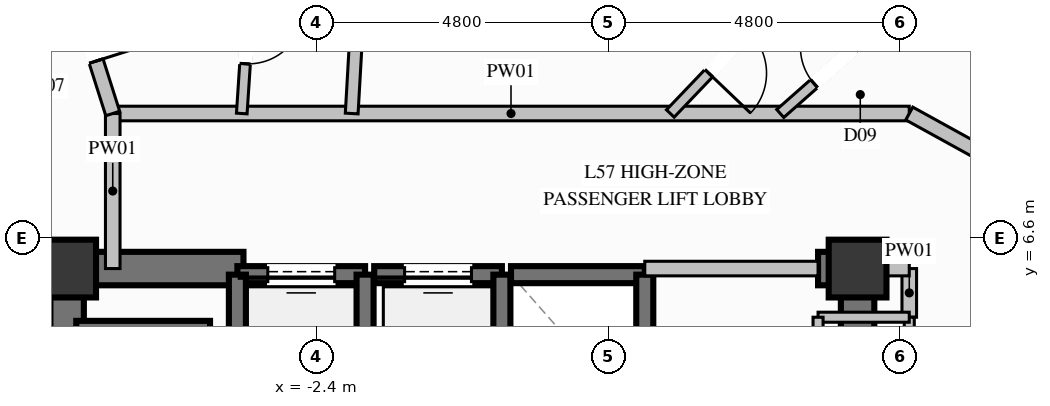
"""IFC4 building model, lengths in metres.
Left out: names, types, materials, properties, quantities, classifications, styles, units other than length and angle.
Written with IfcOpenShell. Run it as: python <this file> out.ifc"""

import sys

from ifc_helpers import new_model, si_unit, direction, frame, frame_2d, origin, origin_2d, place, context, subcontext, project, spatial, rectangle, extrude, element, fill, save


model = new_model("IFC4")
c1 = context("Model", 3, precision=1e-05, world=origin(), true_north=direction((0.0, 1.0)))
c2 = subcontext(c1, "Body", "Model", "MODEL_VIEW")
j1 = project(units=[si_unit("LENGTHUNIT", "METRE"), si_unit("PLANEANGLEUNIT", "RADIAN")], contexts=[c1])
p1 = place(None, origin())
s1 = spatial("IfcSite", under=j1, at=p1, CompositionType="ELEMENT")
p2 = place(p1, origin())
s2 = spatial("IfcBuilding", under=s1, at=p2, CompositionType="ELEMENT")
p3 = place(p2, frame((0.0, 0.0, 220.0)))
s3 = spatial("IfcBuildingStorey", under=s2, at=p3, CompositionType="ELEMENT", Elevation=220.0)
for number, where, z_axis, x_axis in (
    (1, (6.5, 6.1, 0.0), (0.0, 0.0, 1.0), (1.0, 0.0, 0.0)),
    (2, (-6.5, 6.1, 0.0), (0.0, 0.0, 1.0), (1.0, 0.0, 0.0)),
):
    element("IfcColumn", number, at=place(p3, frame(where, z_axis=z_axis, x_axis=x_axis)), inside=s3, PredefinedType="COLUMN", context=c2, shape_type="SweptSolid", body=[
        extrude(rectangle(XDim=0.95, YDim=0.95, at=origin_2d()), origin(), (0.0, 0.0, 1.0), 3.6),
    ])
p4 = place(p3, frame((-6.225, 6.1, 0.0), z_axis=(0.0, 0.0, 1.0), x_axis=(1.0, 0.0, 0.0)))
e3 = element("IfcWall", 3, at=p4, inside=s3, PredefinedType="SHEAR", context=c2, shape_type="SweptSolid", body=[
    extrude(rectangle(XDim=2.625, YDim=0.55, at=frame_2d((1.312, 0.0))), origin(), (0.0, 0.0, 1.0), 3.6),
])
p5 = place(p3, frame((5.85, 6.1, 0.0), z_axis=(0.0, 0.0, 1.0), x_axis=(1.0, 0.0, 0.0)))
e4 = element("IfcWall", 4, at=p5, inside=s3, PredefinedType="SHEAR", context=c2, shape_type="SweptSolid", body=[
    extrude(rectangle(XDim=0.375, YDim=0.55, at=frame_2d((0.188, 0.0))), origin(), (0.0, 0.0, 1.0), 3.6),
])
p6 = place(p3, frame((-6.5, 2.35, 0.0), z_axis=(0.0, 0.0, 1.0), x_axis=(0.0, 1.0, 0.0)))
e5 = element("IfcWall", 5, at=p6, inside=s3, PredefinedType="SHEAR", context=c2, shape_type="SweptSolid", body=[
    extrude(rectangle(XDim=4.025, YDim=0.55, at=frame_2d((2.012, 0.0))), origin(), (0.0, 0.0, 1.0), 3.6),
])
p7 = place(p3, frame((6.5, 3.35, 0.0), z_axis=(0.0, 0.0, 1.0), x_axis=(0.0, 1.0, 0.0)))
e6 = element("IfcWall", 6, at=p7, inside=s3, PredefinedType="SHEAR", context=c2, shape_type="SweptSolid", body=[
    extrude(rectangle(XDim=3.025, YDim=0.55, at=frame_2d((1.512, 0.0))), origin(), (0.0, 0.0, 1.0), 3.6),
])
p8 = place(p3, frame((-1.6, 6.0, 0.0), z_axis=(0.0, 0.0, 1.0), x_axis=(-1.0, 0.0, 0.0)))
e7 = element("IfcWall", 7, at=p8, inside=s3, PredefinedType="SOLIDWALL", context=c2, shape_type="SweptSolid", body=[
    extrude(rectangle(XDim=2.1, YDim=0.28, at=frame_2d((1.05, 0.0))), origin(), (0.0, 0.0, 1.0), 3.36),
])
p9 = place(p8, frame((0.5, 0.0, 0.0)))
e8 = element("IfcOpeningElement", 8, at=p9, cuts=e7, PredefinedType="OPENING", context=c2, shape_type="SweptSolid", body=[
    extrude(rectangle(XDim=1.1, YDim=2.2, at=frame_2d((0.55, 1.1))), frame((0.0, 0.15, 0.0), z_axis=(0.0, -1.0, 0.0), x_axis=(1.0, 0.0, 0.0)), (0.0, 0.0, 1.0), 0.3),
])
for number, where, z_axis, x_axis in (
    (9, (-3.7, 6.0, 0.0), (0.0, 0.0, 1.0), (0.0, -1.0, 0.0)),
    (10, (-1.6, 3.5, 0.0), (0.0, 0.0, 1.0), (0.0, 1.0, 0.0)),
):
    element("IfcWall", number, at=place(p3, frame(where, z_axis=z_axis, x_axis=x_axis)), inside=s3, PredefinedType="SOLIDWALL", context=c2, shape_type="SweptSolid", body=[
        extrude(rectangle(XDim=2.5, YDim=0.28, at=frame_2d((1.25, 0.0))), origin(), (0.0, 0.0, 1.0), 3.36),
    ])
p10 = place(p3, frame((0.65, 6.0, 0.0), z_axis=(0.0, 0.0, 1.0), x_axis=(-1.0, 0.0, 0.0)))
e11 = element("IfcWall", 11, at=p10, inside=s3, PredefinedType="SOLIDWALL", context=c2, shape_type="SweptSolid", body=[
    extrude(rectangle(XDim=2.1, YDim=0.28, at=frame_2d((1.05, 0.0))), origin(), (0.0, 0.0, 1.0), 3.36),
])
p11 = place(p10, frame((0.5, 0.0, 0.0)))
e12 = element("IfcOpeningElement", 12, at=p11, cuts=e11, PredefinedType="OPENING", context=c2, shape_type="SweptSolid", body=[
    extrude(rectangle(XDim=1.1, YDim=2.2, at=frame_2d((0.55, 1.1))), frame((0.0, 0.15, 0.0), z_axis=(0.0, -1.0, 0.0), x_axis=(1.0, 0.0, 0.0)), (0.0, 0.0, 1.0), 0.3),
])
p12 = place(p3, frame((0.65, 3.5, 0.0), z_axis=(0.0, 0.0, 1.0), x_axis=(0.0, 1.0, 0.0)))
e13 = element("IfcWall", 13, at=p12, inside=s3, PredefinedType="SOLIDWALL", context=c2, shape_type="SweptSolid", body=[
    extrude(rectangle(XDim=2.5, YDim=0.28, at=frame_2d((1.25, 0.0))), origin(), (0.0, 0.0, 1.0), 3.36),
])
p13 = place(p3, frame((3.0, 6.0, 0.0), z_axis=(0.0, 0.0, 1.0), x_axis=(-1.0, 0.0, 0.0)))
e14 = element("IfcWall", 14, at=p13, inside=s3, PredefinedType="SOLIDWALL", context=c2, shape_type="SweptSolid", body=[
    extrude(rectangle(XDim=2.2, YDim=0.28, at=frame_2d((1.1, 0.0))), origin(), (0.0, 0.0, 1.0), 3.36),
])
p14 = place(p3, frame((3.0, 3.5, 0.0), z_axis=(0.0, 0.0, 1.0), x_axis=(0.0, 1.0, 0.0)))
e15 = element("IfcWall", 15, at=p14, inside=s3, PredefinedType="SOLIDWALL", context=c2, shape_type="SweptSolid", body=[
    extrude(rectangle(XDim=2.5, YDim=0.28, at=frame_2d((1.25, 0.0))), origin(), (0.0, 0.0, 1.0), 3.36),
])
p15 = place(p3, frame((-4.15, 5.1, 0.0), z_axis=(0.0, 0.0, 1.0), x_axis=(-1.0, 0.0, 0.0)))
e16 = element("IfcWall", 16, at=p15, inside=s3, PredefinedType="SOLIDWALL", context=c2, shape_type="SweptSolid", body=[
    extrude(rectangle(XDim=2.2, YDim=0.28, at=frame_2d((1.1, 0.0))), origin(), (0.0, 0.0, 1.0), 3.36),
])
p16 = place(p3, frame((-5.75, 8.65, 0.0), z_axis=(0.0, 0.0, 1.0), x_axis=(1.0, 0.0, 0.0)))
e17 = element("IfcWall", 17, at=p16, inside=s3, PredefinedType="PARTITIONING", context=c2, shape_type="SweptSolid", body=[
    extrude(rectangle(XDim=13.1, YDim=0.24, at=frame_2d((6.55, 0.0))), origin(), (0.0, 0.0, 1.0), 3.36),
])
p17 = place(p3, frame((3.0, 6.1, 0.0), z_axis=(0.0, 0.0, 1.0), x_axis=(1.0, 0.0, 0.0)))
e18 = element("IfcWall", 18, at=p17, inside=s3, PredefinedType="PARTITIONING", context=c2, shape_type="SweptSolid", body=[
    extrude(rectangle(XDim=2.85, YDim=0.24, at=frame_2d((1.425, 0.0))), origin(), (0.0, 0.0, 1.0), 2.445),
])
p18 = place(p3, frame((7.35, 5.3, 0.0), z_axis=(0.0, 0.0, 1.0), x_axis=(0.0, 1.0, 0.0)))
e19 = element("IfcWall", 19, at=p18, inside=s3, PredefinedType="PARTITIONING", context=c2, shape_type="SweptSolid", body=[
    extrude(rectangle(XDim=0.8, YDim=0.24, at=frame_2d((0.4, 0.0))), origin(), (0.0, 0.0, 1.0), 2.445),
])
p19 = place(p3, frame((6.5, 6.1, 0.0), z_axis=(0.0, 0.0, 1.0), x_axis=(1.0, 0.0, 0.0)))
e20 = element("IfcWall", 20, at=p19, inside=s3, PredefinedType="PARTITIONING", context=c2, shape_type="SweptSolid", body=[
    extrude(rectangle(XDim=0.85, YDim=0.24, at=frame_2d((0.425, 0.0))), origin(), (0.0, 0.0, 1.0), 2.877),
])
p20 = place(p3, frame((-5.75, 6.1, 0.0), z_axis=(0.0, 0.0, 1.0), x_axis=(0.0, 1.0, 0.0)))
e21 = element("IfcWall", 21, at=p20, inside=s3, PredefinedType="PARTITIONING", context=c2, shape_type="SweptSolid", body=[
    extrude(rectangle(XDim=2.55, YDim=0.24, at=frame_2d((1.275, 0.0))), origin(), (0.0, 0.0, 1.0), 3.36),
])
p21 = place(p3, frame((-7.35, 6.1, 0.0), z_axis=(0.0, 0.0, 1.0), x_axis=(1.0, 0.0, 0.0)))
e22 = element("IfcWall", 22, at=p21, inside=s3, PredefinedType="PARTITIONING", context=c2, shape_type="SweptSolid", body=[
    extrude(rectangle(XDim=0.85, YDim=0.24, at=frame_2d((0.425, 0.0))), origin(), (0.0, 0.0, 1.0), 2.877),
])
p22 = place(p3, frame((7.35, 2.75, 0.0), z_axis=(0.0, 0.0, 1.0), x_axis=(0.0, 1.0, 0.0)))
e23 = element("IfcWall", 23, at=p22, inside=s3, PredefinedType="PARTITIONING", context=c2, shape_type="SweptSolid", body=[
    extrude(rectangle(XDim=2.55, YDim=0.165, at=frame_2d((1.275, 0.0))), origin(), (0.0, 0.0, 1.0), 3.36),
])
p23 = place(p22, frame((0.75, 0.0, 0.0)))
e24 = element("IfcOpeningElement", 24, at=p23, cuts=e23, PredefinedType="OPENING", context=c2, shape_type="SweptSolid", body=[
    extrude(rectangle(XDim=1.05, YDim=2.15, at=frame_2d((0.525, 1.075))), frame((0.0, 0.093, 0.0), z_axis=(0.0, -1.0, 0.0), x_axis=(1.0, 0.0, 0.0)), (0.0, 0.0, 1.0), 0.185),
])
p24 = place(p3, frame((7.35, 5.3, 0.0), z_axis=(0.0, 0.0, 1.0), x_axis=(-1.0, 0.0, 0.0)))
e25 = element("IfcWall", 25, at=p24, inside=s3, PredefinedType="PARTITIONING", context=c2, shape_type="SweptSolid", body=[
    extrude(rectangle(XDim=1.5, YDim=0.165, at=frame_2d((0.75, 0.0))), origin(), (0.0, 0.0, 1.0), 2.445),
])
p25 = place(p3, frame((5.85, 5.3, 0.0), z_axis=(0.0, 0.0, 1.0), x_axis=(0.0, -1.0, 0.0)))
e26 = element("IfcWall", 26, at=p25, inside=s3, PredefinedType="PARTITIONING", context=c2, shape_type="SweptSolid", body=[
    extrude(rectangle(XDim=2.55, YDim=0.165, at=frame_2d((1.275, 0.0))), origin(), (0.0, 0.0, 1.0), 2.445),
])
p26 = place(p3, frame((5.342, 10.663, 0.0), z_axis=(0.0, 0.0, 1.0), x_axis=(-0.690559187333, -0.723275887051, 0.0)))
e27 = element("IfcWall", 27, at=p26, inside=s3, PredefinedType="PLUMBINGWALL", context=c2, shape_type="SweptSolid", body=[
    extrude(rectangle(XDim=2.783, YDim=0.175, at=frame_2d((1.392, 0.0))), origin(), (0.0, 0.0, 1.0), 3.36),
])
p27 = place(p26, frame((0.917, 0.0, 0.0)))
e28 = element("IfcOpeningElement", 28, at=p27, cuts=e27, PredefinedType="OPENING", context=c2, shape_type="SweptSolid", body=[
    extrude(rectangle(XDim=0.95, YDim=2.1, at=frame_2d((0.475, 1.05))), frame((0.0, 0.098, 0.0), z_axis=(0.0, -1.0, 0.0), x_axis=(1.0, 0.0, 0.0)), (0.0, 0.0, 1.0), 0.195),
])
p28 = place(p3, frame((5.228, 8.65, 0.0), z_axis=(0.0, 0.0, 1.0), x_axis=(0.749933416173, 0.66151331907, 0.0)))
e29 = element("IfcWall", 29, at=p28, inside=s3, PredefinedType="PLUMBINGWALL", context=c2, shape_type="SweptSolid", body=[
    extrude(rectangle(XDim=2.386, YDim=0.175, at=frame_2d((1.193, 0.0))), origin(), (0.0, 0.0, 1.0), 3.36),
])
p29 = place(p28, frame((0.743, 0.0, 0.0)))
e30 = element("IfcOpeningElement", 30, at=p29, cuts=e29, PredefinedType="OPENING", context=c2, shape_type="SweptSolid", body=[
    extrude(rectangle(XDim=0.9, YDim=2.1, at=frame_2d((0.45, 1.05))), frame((0.0, 0.098, 0.0), z_axis=(0.0, -1.0, 0.0), x_axis=(1.0, 0.0, 0.0)), (0.0, 0.0, 1.0), 0.195),
])
p30 = place(p3, frame((7.35, 8.65, 0.0), z_axis=(0.0, 0.0, 1.0), x_axis=(0.875674474849, -0.482901867979, 0.0)))
e31 = element("IfcWall", 31, at=p30, inside=s3, PredefinedType="PARTITIONING", context=c2, shape_type="SweptSolid", body=[
    extrude(rectangle(XDim=4.193, YDim=0.24, at=frame_2d((2.097, 0.0))), origin(), (0.0, 0.0, 1.0), 3.36),
])
p31 = place(p30, frame((1.597, 0.0, 0.0)))
e32 = element("IfcOpeningElement", 32, at=p31, cuts=e31, PredefinedType="OPENING", context=c2, shape_type="SweptSolid", body=[
    extrude(rectangle(XDim=1.0, YDim=2.2, at=frame_2d((0.5, 1.1))), frame((0.0, 0.13, 0.0), z_axis=(0.0, -1.0, 0.0), x_axis=(1.0, 0.0, 0.0)), (0.0, 0.0, 1.0), 0.26),
])
p32 = place(p3, frame((-1.82, 8.65, 0.0), z_axis=(0.0, 0.0, 1.0), x_axis=(0.056907006267, 0.998379483282, 0.0)))
e33 = element("IfcWall", 33, at=p32, inside=s3, PredefinedType="PARTITIONING", context=c2, shape_type="SweptSolid", body=[
    extrude(rectangle(XDim=12.514, YDim=0.21, at=frame_2d((6.257, 0.0))), origin(), (0.0, 0.0, 1.0), 3.36),
])
p33 = place(p3, frame((-3.461, 11.186, 0.0), z_axis=(0.0, 0.0, 1.0), x_axis=(-0.065702929533, -0.997839228058, 0.0)))
e34 = element("IfcWall", 34, at=p33, inside=s3, PredefinedType="PLUMBINGWALL", context=c2, shape_type="SweptSolid", body=[
    extrude(rectangle(XDim=2.542, YDim=0.175, at=frame_2d((1.271, 0.0))), origin(), (0.0, 0.0, 1.0), 3.36),
])
p34 = place(p33, frame((0.821, 0.0, 0.0)))
e35 = element("IfcOpeningElement", 35, at=p34, cuts=e34, PredefinedType="OPENING", context=c2, shape_type="SweptSolid", body=[
    extrude(rectangle(XDim=0.9, YDim=2.1, at=frame_2d((0.45, 1.05))), frame((0.0, 0.098, 0.0), z_axis=(0.0, -1.0, 0.0), x_axis=(1.0, 0.0, 0.0)), (0.0, 0.0, 1.0), 0.195),
])
p35 = place(p3, frame((-6.6, 11.328, 0.0), z_axis=(0.0, 0.0, 1.0), x_axis=(0.30256159068, -0.953129835775, 0.0)))
e36 = element("IfcWall", 36, at=p35, inside=s3, PredefinedType="PARTITIONING", context=c2, shape_type="SweptSolid", body=[
    extrude(rectangle(XDim=2.81, YDim=0.24, at=frame_2d((1.405, 0.0))), origin(), (0.0, 0.0, 1.0), 3.36),
])
p36 = place(p35, frame((0.905, 0.0, 0.0)))
e37 = element("IfcOpeningElement", 37, at=p36, cuts=e36, PredefinedType="OPENING", context=c2, shape_type="SweptSolid", body=[
    extrude(rectangle(XDim=1.0, YDim=2.2, at=frame_2d((0.5, 1.1))), frame((0.0, 0.13, 0.0), z_axis=(0.0, -1.0, 0.0), x_axis=(1.0, 0.0, 0.0)), (0.0, 0.0, 1.0), 0.26),
])
p37 = place(p3, frame((-6.6, 11.328, 0.0), z_axis=(0.0, 0.0, 1.0), x_axis=(-0.708544738437, -0.705665893772, 0.0)))
e38 = element("IfcWall", 38, at=p37, inside=s3, PredefinedType="PARTITIONING", context=c2, shape_type="SweptSolid", body=[
    extrude(rectangle(XDim=2.799, YDim=0.24, at=frame_2d((1.399, 0.0))), origin(), (0.0, 0.0, 1.0), 3.36),
])
p38 = place(p9, origin())
e39 = element("IfcDoor", 39, at=p38, inside=s3, OperationType="SLIDING_TO_LEFT", PredefinedType="DOOR", context=c2, shape_type="SweptSolid", body=[
    extrude(rectangle(XDim=1.1, YDim=2.2, at=frame_2d((0.55, 1.1))), frame((0.0, 0.025, 0.0), z_axis=(0.0, -1.0, 0.0), x_axis=(1.0, 0.0, 0.0)), (0.0, 0.0, 1.0), 0.05),
])
fill(e8, e39)
p39 = place(p11, origin())
e40 = element("IfcDoor", 40, at=p39, inside=s3, OperationType="SLIDING_TO_LEFT", PredefinedType="DOOR", context=c2, shape_type="SweptSolid", body=[
    extrude(rectangle(XDim=1.1, YDim=2.2, at=frame_2d((0.55, 1.1))), frame((0.0, 0.025, 0.0), z_axis=(0.0, -1.0, 0.0), x_axis=(1.0, 0.0, 0.0)), (0.0, 0.0, 1.0), 0.05),
])
fill(e12, e40)
p40 = place(p29, origin())
e41 = element("IfcDoor", 41, at=p40, inside=s3, OperationType="SINGLE_SWING_RIGHT", PredefinedType="DOOR", context=c2, shape_type="SweptSolid", body=[
    extrude(rectangle(XDim=0.9, YDim=2.1, at=frame_2d((0.45, 1.05))), frame((0.0, 0.025, 0.0), z_axis=(0.0, -1.0, 0.0), x_axis=(1.0, 0.0, 0.0)), (0.0, 0.0, 1.0), 0.05),
])
fill(e30, e41)
p41 = place(p27, origin())
e42 = element("IfcDoor", 42, at=p41, inside=s3, OperationType="SINGLE_SWING_RIGHT", PredefinedType="DOOR", context=c2, shape_type="SweptSolid", body=[
    extrude(rectangle(XDim=0.95, YDim=2.1, at=frame_2d((0.475, 1.05))), frame((0.0, 0.025, 0.0), z_axis=(0.0, -1.0, 0.0), x_axis=(1.0, 0.0, 0.0)), (0.0, 0.0, 1.0), 0.05),
])
fill(e28, e42)
p42 = place(p34, origin())
e43 = element("IfcDoor", 43, at=p42, inside=s3, OperationType="SINGLE_SWING_LEFT", PredefinedType="DOOR", context=c2, shape_type="SweptSolid", body=[
    extrude(rectangle(XDim=0.9, YDim=2.1, at=frame_2d((0.45, 1.05))), frame((0.0, 0.025, 0.0), z_axis=(0.0, -1.0, 0.0), x_axis=(1.0, 0.0, 0.0)), (0.0, 0.0, 1.0), 0.05),
])
fill(e35, e43)
p43 = place(p36, origin())
e44 = element("IfcDoor", 44, at=p43, inside=s3, OperationType="SINGLE_SWING_RIGHT", PredefinedType="DOOR", context=c2, shape_type="SweptSolid", body=[
    extrude(rectangle(XDim=1.0, YDim=2.2, at=frame_2d((0.5, 1.1))), frame((0.0, 0.025, 0.0), z_axis=(0.0, -1.0, 0.0), x_axis=(1.0, 0.0, 0.0)), (0.0, 0.0, 1.0), 0.05),
])
fill(e37, e44)
save(model, sys.argv[1])
